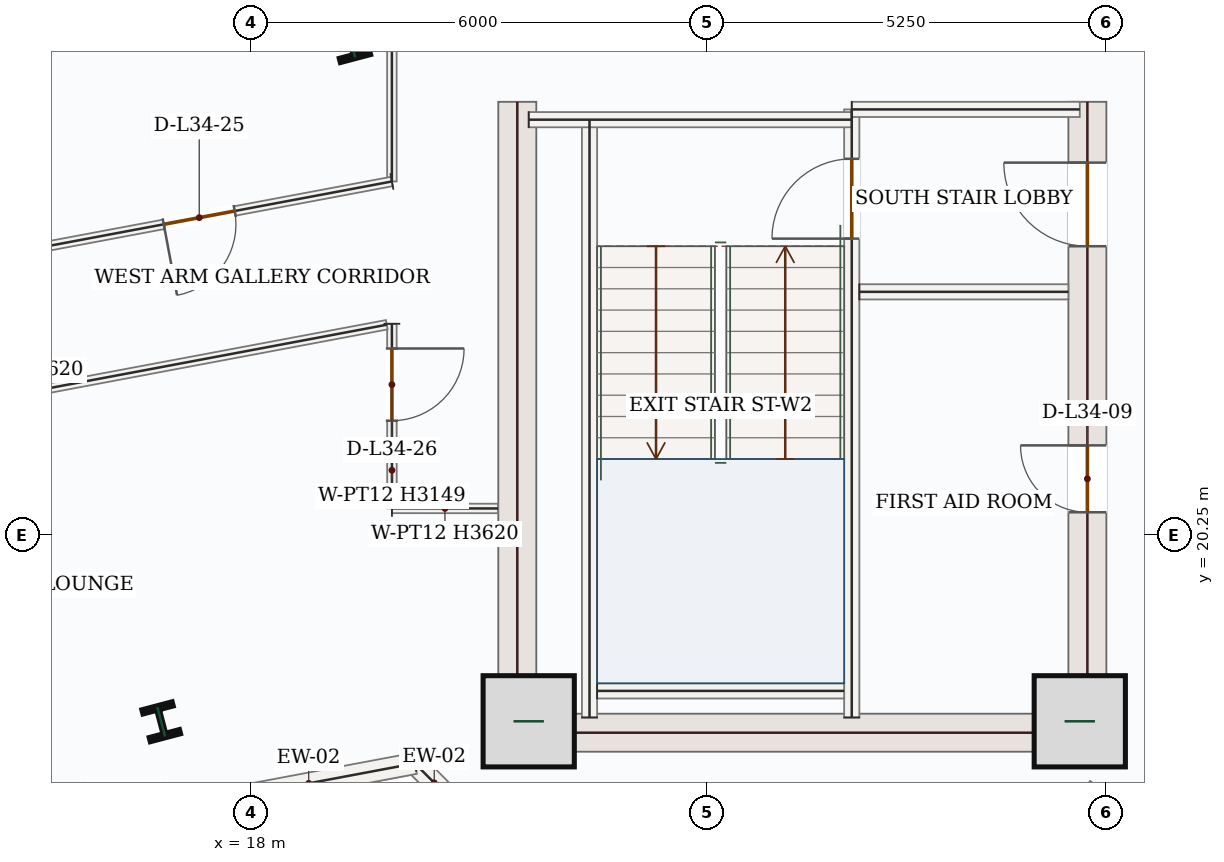
"""IFC4 building model, lengths in metres.
Left out: names, types, materials, properties, quantities, classifications, styles, units other than length and angle.
Written with IfcOpenShell. Run it as: python <this file> out.ifc"""

import sys

from ifc_helpers import new_model, si_unit, direction, frame, frame_2d, origin, origin_2d, place, context, subcontext, project, spatial, rectangle, i_section, extrude, source, transform, mapped, element, fill, save


model = new_model("IFC4")
c1 = context("Model", 3, precision=1e-05, world=origin(), true_north=direction((0.0, 1.0)))
c2 = subcontext(c1, "Body", "Model", "MODEL_VIEW")
j1 = project(units=[si_unit("LENGTHUNIT", "METRE"), si_unit("PLANEANGLEUNIT", "RADIAN")], contexts=[c1])
p1 = place(None, origin())
s1 = spatial("IfcSite", under=j1, at=p1, CompositionType="ELEMENT")
p2 = place(p1, origin())
s2 = spatial("IfcBuilding", under=s1, at=p2, CompositionType="ELEMENT")
p3 = place(p2, frame((0.0, 0.0, 151.2)))
s3 = spatial("IfcBuildingStorey", under=s2, at=p3, CompositionType="ELEMENT", Elevation=151.2)
m1 = source(origin(), c2, "Body", "SweptSolid", [
    extrude(rectangle(XDim=8.55, YDim=0.5, at=frame_2d((4.275, 0.0))), origin(), (0.0, 0.0, 1.0), 3.62),
])
p4 = place(p3, frame((21.5, 17.4, 0.0), z_axis=(0.0, 0.0, 1.0), x_axis=(0.0, 1.0, 0.0)))
e1 = element("IfcWall", 1, at=p4, inside=s3, PredefinedType="SHEAR", context=c2, shape_type="MappedRepresentation", body=[
    mapped(m1, transform((0.0, 0.0, 0.0), x_axis=(1.0, 0.0, 0.0), y_axis=(0.0, 1.0, 0.0), z_axis=(0.0, 0.0, 1.0), scale=1.0)),
])
p5 = place(p3, frame((29.0, 17.4, 0.0), z_axis=(0.0, 0.0, 1.0), x_axis=(0.0, 1.0, 0.0)))
e2 = element("IfcWall", 2, at=p5, inside=s3, PredefinedType="SHEAR", context=c2, shape_type="SweptSolid", body=[
    extrude(rectangle(XDim=8.55, YDim=0.5, at=frame_2d((4.275, 0.0))), origin(), (0.0, 0.0, 1.0), 3.62),
])
p6 = place(p5, frame((6.65, 0.0, 0.0)))
e3 = element("IfcOpeningElement", 3, at=p6, cuts=e2, PredefinedType="OPENING", context=c2, shape_type="SweptSolid", body=[
    extrude(rectangle(XDim=1.1, YDim=2.2, at=frame_2d((0.55, 1.1))), frame((0.0, 0.26, 0.0), z_axis=(0.0, -1.0, 0.0), x_axis=(1.0, 0.0, 0.0)), (0.0, 0.0, 1.0), 0.52),
])
p7 = place(p5, frame((3.15, 0.0, 0.0)))
e4 = element("IfcOpeningElement", 4, at=p7, cuts=e2, PredefinedType="OPENING", context=c2, shape_type="SweptSolid", body=[
    extrude(rectangle(XDim=0.88, YDim=2.1, at=frame_2d((0.44, 1.05))), frame((0.0, 0.26, 0.0), z_axis=(0.0, -1.0, 0.0), x_axis=(1.0, 0.0, 0.0)), (0.0, 0.0, 1.0), 0.52),
])
m2 = source(origin(), c2, "Body", "SweptSolid", [
    extrude(rectangle(XDim=7.0, YDim=0.5, at=frame_2d((3.5, 0.0))), origin(), (0.0, 0.0, 1.0), 3.62),
])
p8 = place(p3, frame((21.75, 17.65, 0.0), z_axis=(0.0, 0.0, 1.0), x_axis=(1.0, 0.0, 0.0)))
e5 = element("IfcWall", 5, at=p8, inside=s3, PredefinedType="SHEAR", context=c2, shape_type="MappedRepresentation", body=[
    mapped(m2, transform((0.0, 0.0, 0.0), x_axis=(1.0, 0.0, 0.0), y_axis=(0.0, 1.0, 0.0), z_axis=(0.0, 0.0, 1.0), scale=1.0)),
])
m3 = source(origin(), c2, "Body", "SweptSolid", [
    extrude(rectangle(XDim=1.2, YDim=1.2, at=origin_2d()), origin(), (0.0, 0.0, 1.0), 3.9),
])
for number, where, z_axis, x_axis in (
    (6, (21.65, 17.8, 0.0), (0.0, 0.0, 1.0), (1.0, 0.0, 0.0)),
    (7, (28.9, 17.8, 0.0), (0.0, 0.0, 1.0), (1.0, 0.0, 0.0)),
):
    element("IfcColumn", number, at=place(p3, frame(where, z_axis=z_axis, x_axis=x_axis)), inside=s3, PredefinedType="COLUMN", context=c2, shape_type="MappedRepresentation", body=[
        mapped(m3, transform((0.0, 0.0, 0.0), x_axis=(1.0, 0.0, 0.0), y_axis=(0.0, 1.0, 0.0), z_axis=(0.0, 0.0, 1.0), scale=1.0)),
    ])
m4 = source(origin(), c2, "Body", "SweptSolid", [
    extrude(i_section(OverallWidth=0.412, OverallDepth=0.435, WebThickness=0.036, FlangeThickness=0.057, FilletRadius=0.018, at=origin_2d()), origin(), (0.0, 0.0, 1.0), 3.9),
])
for number, where, z_axis, x_axis in (
    (8, (19.316, 26.729, 0.0), (0.0, 0.0, 1.0), (0.967, 0.255, 0.0)),
    (9, (16.815, 17.794, 0.0), (0.0, 0.0, 1.0), (0.967, 0.255, 0.0)),
):
    element("IfcColumn", number, at=place(p3, frame(where, z_axis=z_axis, x_axis=x_axis)), inside=s3, PredefinedType="COLUMN", context=c2, shape_type="MappedRepresentation", body=[
        mapped(m4, transform((0.0, 0.0, 0.0), x_axis=(1.0, 0.0, 0.0), y_axis=(0.0, 1.0, 0.0), z_axis=(0.0, 0.0, 1.0), scale=1.0)),
    ])
p9 = place(p3, frame((22.658, 14.74, 0.0), z_axis=(0.0, 0.0, 1.0), x_axis=(-0.707106781187, 0.707106781187, 0.0)))
e10 = element("IfcWall", 10, at=p9, inside=s3, PredefinedType="SOLIDWALL", context=c2, shape_type="SweptSolid", body=[
    extrude(rectangle(XDim=3.544, YDim=0.28, at=frame_2d((1.772, 0.0))), origin(), (0.0, 0.0, 1.0), 3.62),
])
p10 = place(p9, frame((0.872, 0.0, 0.85)))
e11 = element("IfcOpeningElement", 11, at=p10, cuts=e10, PredefinedType="OPENING", context=c2, shape_type="SweptSolid", body=[
    extrude(rectangle(XDim=1.8, YDim=1.75, at=frame_2d((0.9, 0.875))), frame((0.0, 0.15, 0.0), z_axis=(0.0, -1.0, 0.0), x_axis=(1.0, 0.0, 0.0)), (0.0, 0.0, 1.0), 0.3),
])
p11 = place(p3, frame((20.152, 17.246, 0.0), z_axis=(0.0, 0.0, 1.0), x_axis=(-0.982809278234, -0.18462373254, 0.0)))
e12 = element("IfcWall", 12, at=p11, inside=s3, PredefinedType="SOLIDWALL", context=c2, shape_type="SweptSolid", body=[
    extrude(rectangle(XDim=7.783, YDim=0.28, at=frame_2d((3.892, 0.0))), origin(), (0.0, 0.0, 1.0), 3.62),
])
p12 = place(p11, frame((2.992, 0.0, 0.85)))
e13 = element("IfcOpeningElement", 13, at=p12, cuts=e12, PredefinedType="OPENING", context=c2, shape_type="SweptSolid", body=[
    extrude(rectangle(XDim=1.8, YDim=1.75, at=frame_2d((0.9, 0.875))), frame((0.0, 0.15, 0.0), z_axis=(0.0, -1.0, 0.0), x_axis=(1.0, 0.0, 0.0)), (0.0, 0.0, 1.0), 0.3),
])
m5 = source(origin(), c2, "Body", "SweptSolid", [
    extrude(rectangle(XDim=7.87, YDim=0.2, at=frame_2d((3.935, 0.0))), origin(), (0.0, 0.0, 1.0), 3.62),
])
p13 = place(p3, frame((22.45, 17.85, 0.0), z_axis=(0.0, 0.0, 1.0), x_axis=(0.0, 1.0, 0.0)))
e14 = element("IfcWall", 14, at=p13, inside=s3, PredefinedType="SOLIDWALL", context=c2, shape_type="MappedRepresentation", body=[
    mapped(m5, transform((0.0, 0.0, 0.0), x_axis=(1.0, 0.0, 0.0), y_axis=(0.0, 1.0, 0.0), z_axis=(0.0, 0.0, 1.0), scale=1.0)),
])
p14 = place(p3, frame((25.9, 17.85, 0.0), z_axis=(0.0, 0.0, 1.0), x_axis=(0.0, 1.0, 0.0)))
e15 = element("IfcWall", 15, at=p14, inside=s3, PredefinedType="SOLIDWALL", context=c2, shape_type="SweptSolid", body=[
    extrude(rectangle(XDim=8.0, YDim=0.2, at=frame_2d((4.0, 0.0))), origin(), (0.0, 0.0, 1.0), 3.62),
])
p15 = place(p14, frame((6.3, 0.0, 0.0)))
e16 = element("IfcOpeningElement", 16, at=p15, cuts=e15, PredefinedType="OPENING", context=c2, shape_type="SweptSolid", body=[
    extrude(rectangle(XDim=1.05, YDim=2.15, at=frame_2d((0.525, 1.075))), frame((0.0, 0.11, 0.0), z_axis=(0.0, -1.0, 0.0), x_axis=(1.0, 0.0, 0.0)), (0.0, 0.0, 1.0), 0.22),
])
m6 = source(origin(), c2, "Body", "SweptSolid", [
    extrude(rectangle(XDim=4.25, YDim=0.2, at=frame_2d((2.125, 0.0))), origin(), (0.0, 0.0, 1.0), 3.62),
])
p16 = place(p3, frame((21.65, 25.715, 0.0), z_axis=(0.0, 0.0, 1.0), x_axis=(1.0, 0.0, 0.0)))
e17 = element("IfcWall", 17, at=p16, inside=s3, PredefinedType="SOLIDWALL", context=c2, shape_type="MappedRepresentation", body=[
    mapped(m6, transform((0.0, 0.0, 0.0), x_axis=(1.0, 0.0, 0.0), y_axis=(0.0, 1.0, 0.0), z_axis=(0.0, 0.0, 1.0), scale=1.0)),
])
m7 = source(origin(), c2, "Body", "SweptSolid", [
    extrude(rectangle(XDim=3.0, YDim=0.2, at=frame_2d((1.5, 0.0))), origin(), (0.0, 0.0, 1.0), 3.62),
])
p17 = place(p3, frame((25.9, 25.85, 0.0), z_axis=(0.0, 0.0, 1.0), x_axis=(1.0, 0.0, 0.0)))
e18 = element("IfcWall", 18, at=p17, inside=s3, PredefinedType="SOLIDWALL", context=c2, shape_type="MappedRepresentation", body=[
    mapped(m7, transform((0.0, 0.0, 0.0), x_axis=(1.0, 0.0, 0.0), y_axis=(0.0, 1.0, 0.0), z_axis=(0.0, 0.0, 1.0), scale=1.0)),
])
m8 = source(origin(), c2, "Body", "SweptSolid", [
    extrude(rectangle(XDim=3.25, YDim=0.2, at=frame_2d((1.625, 0.0))), origin(), (0.0, 0.0, 1.0), 3.62),
])
p18 = place(p3, frame((22.55, 18.2, 0.0), z_axis=(0.0, 0.0, 1.0), x_axis=(1.0, 0.0, 0.0)))
e19 = element("IfcWall", 19, at=p18, inside=s3, PredefinedType="SOLIDWALL", context=c2, shape_type="MappedRepresentation", body=[
    mapped(m8, transform((0.0, 0.0, 0.0), x_axis=(1.0, 0.0, 0.0), y_axis=(0.0, 1.0, 0.0), z_axis=(0.0, 0.0, 1.0), scale=1.0)),
])
m9 = source(origin(), c2, "Body", "SweptSolid", [
    extrude(rectangle(XDim=2.75, YDim=0.2, at=frame_2d((1.375, 0.0))), origin(), (0.0, 0.0, 1.0), 3.62),
])
p19 = place(p3, frame((26.0, 23.45, 0.0), z_axis=(0.0, 0.0, 1.0), x_axis=(1.0, 0.0, 0.0)))
e20 = element("IfcWall", 20, at=p19, inside=s3, PredefinedType="SOLIDWALL", context=c2, shape_type="MappedRepresentation", body=[
    mapped(m9, transform((0.0, 0.0, 0.0), x_axis=(1.0, 0.0, 0.0), y_axis=(0.0, 1.0, 0.0), z_axis=(0.0, 0.0, 1.0), scale=1.0)),
])
m10 = source(origin(), c2, "Body", "SweptSolid", [
    extrude(rectangle(XDim=2.53, YDim=0.125, at=frame_2d((1.265, 0.0))), origin(), (0.0, 0.0, 1.0), 3.62),
])
p20 = place(p3, frame((27.67, 14.885, 0.0), z_axis=(0.0, 0.0, 1.0), x_axis=(0.560455418396, 0.82818459536, 0.0)))
e21 = element("IfcWall", 21, at=p20, inside=s3, PredefinedType="PARTITIONING", context=c2, shape_type="MappedRepresentation", body=[
    mapped(m10, transform((0.0, 0.0, 0.0), x_axis=(1.0, 0.0, 0.0), y_axis=(0.0, 1.0, 0.0), z_axis=(0.0, 0.0, 1.0), scale=1.0)),
])
m11 = source(origin(), c2, "Body", "SweptSolid", [
    extrude(rectangle(XDim=5.975, YDim=0.125, at=frame_2d((2.988, 0.0))), origin(), (0.0, 0.0, 1.0), 2.766),
])
p21 = place(p3, frame((19.85, 30.877, 0.0), z_axis=(0.0, 0.0, 1.0), x_axis=(0.0, -1.0, 0.0)))
e22 = element("IfcWall", 22, at=p21, inside=s3, PredefinedType="PARTITIONING", context=c2, shape_type="MappedRepresentation", body=[
    mapped(m11, transform((0.0, 0.0, 0.0), x_axis=(1.0, 0.0, 0.0), y_axis=(0.0, 1.0, 0.0), z_axis=(0.0, 0.0, 1.0), scale=1.0)),
])
p22 = place(p3, frame((19.85, 24.902, 0.0), z_axis=(0.0, 0.0, 1.0), x_axis=(-0.982804817995, -0.184647474194, 0.0)))
e23 = element("IfcWall", 23, at=p22, inside=s3, PredefinedType="PARTITIONING", context=c2, shape_type="SweptSolid", body=[
    extrude(rectangle(XDim=10.513, YDim=0.125, at=frame_2d((5.256, 0.0))), origin(), (0.0, 0.0, 1.0), 3.62),
])
p23 = place(p22, frame((2.104, 0.0, 0.0)))
e24 = element("IfcOpeningElement", 24, at=p23, cuts=e23, PredefinedType="OPENING", context=c2, shape_type="SweptSolid", body=[
    extrude(rectangle(XDim=0.95, YDim=2.15, at=frame_2d((0.475, 1.075))), frame((0.0, 0.073, 0.0), z_axis=(0.0, -1.0, 0.0), x_axis=(1.0, 0.0, 0.0)), (0.0, 0.0, 1.0), 0.145),
])
p24 = place(p3, frame((19.85, 23.03, 0.0), z_axis=(0.0, 0.0, 1.0), x_axis=(0.00040209084, -0.999999919161, 0.0)))
e25 = element("IfcWall", 25, at=p24, inside=s3, PredefinedType="PARTITIONING", context=c2, shape_type="SweptSolid", body=[
    extrude(rectangle(XDim=2.429, YDim=0.125, at=frame_2d((1.214, 0.0))), origin(), (0.0, 0.0, 1.0), 3.149),
])
p25 = place(p24, frame((0.325, 0.0, 0.0)))
e26 = element("IfcOpeningElement", 26, at=p25, cuts=e25, PredefinedType="OPENING", context=c2, shape_type="SweptSolid", body=[
    extrude(rectangle(XDim=0.95, YDim=2.15, at=frame_2d((0.475, 1.075))), frame((0.0, 0.073, 0.0), z_axis=(0.0, -1.0, 0.0), x_axis=(1.0, 0.0, 0.0)), (0.0, 0.0, 1.0), 0.145),
])
m12 = source(origin(), c2, "Body", "SweptSolid", [
    extrude(rectangle(XDim=1.394, YDim=0.125, at=frame_2d((0.697, 0.0))), origin(), (0.0, 0.0, 1.0), 3.62),
])
p26 = place(p3, frame((19.851, 20.601, 0.0), z_axis=(0.0, 0.0, 1.0), x_axis=(0.999999754632, -0.000700525222, 0.0)))
e27 = element("IfcWall", 27, at=p26, inside=s3, PredefinedType="PARTITIONING", context=c2, shape_type="MappedRepresentation", body=[
    mapped(m12, transform((0.0, 0.0, 0.0), x_axis=(1.0, 0.0, 0.0), y_axis=(0.0, 1.0, 0.0), z_axis=(0.0, 0.0, 1.0), scale=1.0)),
])
m13 = source(origin(), c2, "Body", "SweptSolid", [
    extrude(rectangle(XDim=10.098, YDim=0.125, at=frame_2d((5.049, 0.0))), origin(), (0.0, 0.0, 1.0), 3.62),
])
p27 = place(p3, frame((9.858, 21.153, 0.0), z_axis=(0.0, 0.0, 1.0), x_axis=(0.982807535277, 0.1846330106, 0.0)))
e28 = element("IfcWall", 28, at=p27, inside=s3, PredefinedType="PARTITIONING", context=c2, shape_type="MappedRepresentation", body=[
    mapped(m13, transform((0.0, 0.0, 0.0), x_axis=(1.0, 0.0, 0.0), y_axis=(0.0, 1.0, 0.0), z_axis=(0.0, 0.0, 1.0), scale=1.0)),
])
m14 = source(origin(), c2, "Body", "SweptSolid", [
    extrude(rectangle(XDim=1.05, YDim=2.15, at=frame_2d((0.525, 1.075))), frame((0.0, 0.025, 0.0), z_axis=(0.0, -1.0, 0.0), x_axis=(1.0, 0.0, 0.0)), (0.0, 0.0, 1.0), 0.05),
])
p28 = place(p15, origin())
e29 = element("IfcDoor", 29, at=p28, inside=s3, OperationType="SINGLE_SWING_LEFT", PredefinedType="DOOR", context=c2, shape_type="MappedRepresentation", body=[
    mapped(m14, transform((0.0, 0.0, 0.0), x_axis=(1.0, 0.0, 0.0), y_axis=(0.0, 1.0, 0.0), z_axis=(0.0, 0.0, 1.0), scale=1.0)),
])
fill(e16, e29)
m15 = source(origin(), c2, "Body", "SweptSolid", [
    extrude(rectangle(XDim=1.1, YDim=2.2, at=frame_2d((0.55, 1.1))), frame((0.0, 0.025, 0.0), z_axis=(0.0, -1.0, 0.0), x_axis=(1.0, 0.0, 0.0)), (0.0, 0.0, 1.0), 0.05),
])
p29 = place(p6, origin())
e30 = element("IfcDoor", 30, at=p29, inside=s3, OperationType="SINGLE_SWING_RIGHT", PredefinedType="DOOR", context=c2, shape_type="MappedRepresentation", body=[
    mapped(m15, transform((0.0, 0.0, 0.0), x_axis=(1.0, 0.0, 0.0), y_axis=(0.0, 1.0, 0.0), z_axis=(0.0, 0.0, 1.0), scale=1.0)),
])
fill(e3, e30)
m16 = source(origin(), c2, "Body", "SweptSolid", [
    extrude(rectangle(XDim=0.88, YDim=2.1, at=frame_2d((0.44, 1.05))), frame((0.0, 0.025, 0.0), z_axis=(0.0, -1.0, 0.0), x_axis=(1.0, 0.0, 0.0)), (0.0, 0.0, 1.0), 0.05),
])
p30 = place(p7, origin())
e31 = element("IfcDoor", 31, at=p30, inside=s3, OperationType="SINGLE_SWING_RIGHT", PredefinedType="DOOR", context=c2, shape_type="MappedRepresentation", body=[
    mapped(m16, transform((0.0, 0.0, 0.0), x_axis=(1.0, 0.0, 0.0), y_axis=(0.0, 1.0, 0.0), z_axis=(0.0, 0.0, 1.0), scale=1.0)),
])
fill(e4, e31)
m17 = source(origin(), c2, "Body", "SweptSolid", [
    extrude(rectangle(XDim=0.95, YDim=2.15, at=frame_2d((0.475, 1.075))), frame((0.0, 0.025, 0.0), z_axis=(0.0, -1.0, 0.0), x_axis=(1.0, 0.0, 0.0)), (0.0, 0.0, 1.0), 0.05),
])
p31 = place(p23, origin())
e32 = element("IfcDoor", 32, at=p31, inside=s3, OperationType="SINGLE_SWING_RIGHT", PredefinedType="DOOR", context=c2, shape_type="MappedRepresentation", body=[
    mapped(m17, transform((0.0, 0.0, 0.0), x_axis=(1.0, 0.0, 0.0), y_axis=(0.0, 1.0, 0.0), z_axis=(0.0, 0.0, 1.0), scale=1.0)),
])
fill(e24, e32)
p32 = place(p25, origin())
e33 = element("IfcDoor", 33, at=p32, inside=s3, OperationType="SINGLE_SWING_LEFT", PredefinedType="DOOR", context=c2, shape_type="MappedRepresentation", body=[
    mapped(m17, transform((0.0, 0.0, 0.0), x_axis=(1.0, 0.0, 0.0), y_axis=(0.0, 1.0, 0.0), z_axis=(0.0, 0.0, 1.0), scale=1.0)),
])
fill(e26, e33)
save(model, sys.argv[1])
